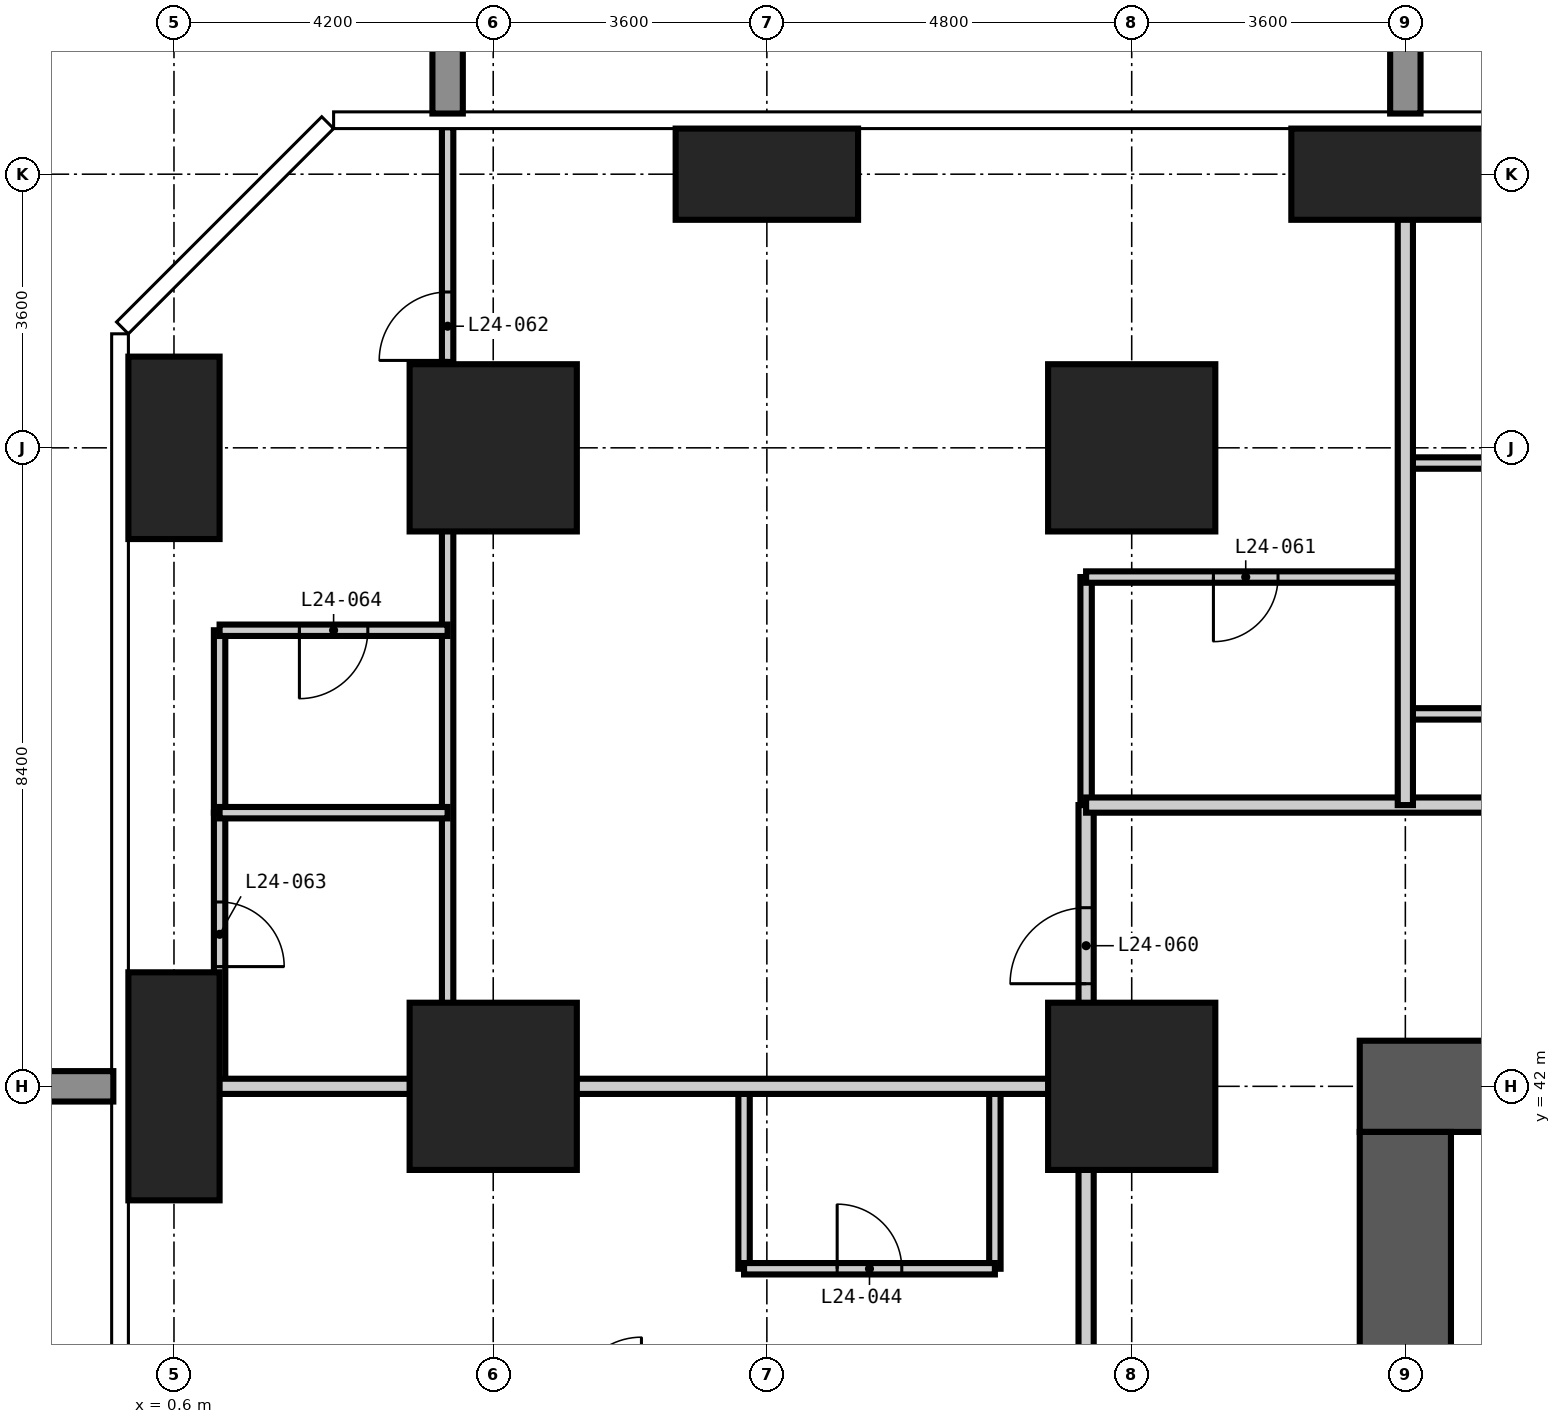
"""IFC4 building model, lengths in metres.
Left out: names, types, materials, properties, quantities, classifications, styles, units other than length and angle.
Written with IfcOpenShell. Run it as: python <this file> out.ifc"""

import sys

from ifc_helpers import new_model, si_unit, direction, frame, frame_2d, origin, origin_2d, place, context, subcontext, project, spatial, rectangle, extrude, element, fill, save


model = new_model("IFC4")
c1 = context("Model", 3, precision=1e-05, world=origin(), true_north=direction((0.0, 1.0)))
c2 = subcontext(c1, "Body", "Model", "MODEL_VIEW")
j1 = project(units=[si_unit("LENGTHUNIT", "METRE"), si_unit("PLANEANGLEUNIT", "RADIAN")], contexts=[c1])
p1 = place(None, origin())
s1 = spatial("IfcSite", under=j1, at=p1, CompositionType="ELEMENT")
p2 = place(p1, origin())
s2 = spatial("IfcBuilding", under=s1, at=p2, CompositionType="ELEMENT")
p3 = place(p2, frame((0.0, 0.0, 97.2)))
s3 = spatial("IfcBuildingStorey", under=s2, at=p3, CompositionType="ELEMENT", Elevation=97.2)
p4 = place(p3, frame((0.6, 42.0, -0.35), z_axis=(0.0, 0.0, 1.0), x_axis=(1.0, 0.0, 0.0)))
e1 = element("IfcColumn", 1, at=p4, inside=s3, PredefinedType="COLUMN", context=c2, shape_type="SweptSolid", body=[
    extrude(rectangle(XDim=1.2, YDim=3.0, at=origin_2d()), origin(), (0.0, 0.0, 1.0), 3.6),
])
p5 = place(p3, frame((0.6, 50.4, -0.35), z_axis=(0.0, 0.0, 1.0), x_axis=(1.0, 0.0, 0.0)))
e2 = element("IfcColumn", 2, at=p5, inside=s3, PredefinedType="COLUMN", context=c2, shape_type="SweptSolid", body=[
    extrude(rectangle(XDim=1.2, YDim=2.4, at=origin_2d()), origin(), (0.0, 0.0, 1.0), 3.6),
])
for number, where, z_axis, x_axis in (
    (3, (4.8, 42.0, -0.35), (0.0, 0.0, 1.0), (1.0, 0.0, 0.0)),
    (4, (4.8, 50.4, -0.35), (0.0, 0.0, 1.0), (1.0, 0.0, 0.0)),
):
    element("IfcColumn", number, at=place(p3, frame(where, z_axis=z_axis, x_axis=x_axis)), inside=s3, PredefinedType="COLUMN", context=c2, shape_type="SweptSolid", body=[
        extrude(rectangle(XDim=2.2, YDim=2.2, at=origin_2d()), origin(), (0.0, 0.0, 1.0), 3.6),
    ])
p6 = place(p3, frame((8.4, 54.0, -0.35), z_axis=(0.0, 0.0, 1.0), x_axis=(1.0, 0.0, 0.0)))
e5 = element("IfcColumn", 5, at=p6, inside=s3, PredefinedType="COLUMN", context=c2, shape_type="SweptSolid", body=[
    extrude(rectangle(XDim=2.4, YDim=1.2, at=origin_2d()), origin(), (0.0, 0.0, 1.0), 3.6),
])
for number, where, z_axis, x_axis in (
    (6, (13.2, 42.0, -0.35), (0.0, 0.0, 1.0), (1.0, 0.0, 0.0)),
    (7, (13.2, 50.4, -0.35), (0.0, 0.0, 1.0), (1.0, 0.0, 0.0)),
):
    element("IfcColumn", number, at=place(p3, frame(where, z_axis=z_axis, x_axis=x_axis)), inside=s3, PredefinedType="COLUMN", context=c2, shape_type="SweptSolid", body=[
        extrude(rectangle(XDim=2.2, YDim=2.2, at=origin_2d()), origin(), (0.0, 0.0, 1.0), 3.6),
    ])
p7 = place(p3, frame((16.8, 54.0, -0.35), z_axis=(0.0, 0.0, 1.0), x_axis=(1.0, 0.0, 0.0)))
e8 = element("IfcColumn", 8, at=p7, inside=s3, PredefinedType="COLUMN", context=c2, shape_type="SweptSolid", body=[
    extrude(rectangle(XDim=3.0, YDim=1.2, at=origin_2d()), origin(), (0.0, 0.0, 1.0), 3.6),
])
p8 = place(p3, frame((42.6, 42.0, -0.35), z_axis=(0.0, 0.0, 1.0), x_axis=(-1.0, 0.0, 0.0)))
e9 = element("IfcWall", 9, at=p8, inside=s3, PredefinedType="SHEAR", context=c2, shape_type="SweptSolid", body=[
    extrude(rectangle(XDim=26.4, YDim=1.2, at=frame_2d((13.2, 0.0))), origin(), (0.0, 0.0, 1.0), 3.6),
])
p9 = place(p8, frame((21.1, 0.0, 0.35)))
e10 = element("IfcOpeningElement", 10, at=p9, cuts=e9, PredefinedType="OPENING", context=c2, shape_type="SweptSolid", body=[
    extrude(rectangle(XDim=1.0, YDim=2.1, at=frame_2d((0.5, 1.05))), frame((0.0, 0.61, 0.0), z_axis=(0.0, -1.0, 0.0), x_axis=(1.0, 0.0, 0.0)), (0.0, 0.0, 1.0), 1.22),
])
p10 = place(p8, frame((10.5, 0.0, 0.35)))
e11 = element("IfcOpeningElement", 11, at=p10, cuts=e9, PredefinedType="OPENING", context=c2, shape_type="SweptSolid", body=[
    extrude(rectangle(XDim=1.2, YDim=2.2, at=frame_2d((0.6, 1.1))), frame((0.0, 0.61, 0.0), z_axis=(0.0, -1.0, 0.0), x_axis=(1.0, 0.0, 0.0)), (0.0, 0.0, 1.0), 1.22),
])
p11 = place(p3, frame((16.8, 41.4, -0.35), z_axis=(0.0, 0.0, 1.0), x_axis=(0.0, -1.0, 0.0)))
e12 = element("IfcWall", 12, at=p11, inside=s3, PredefinedType="SHEAR", context=c2, shape_type="SweptSolid", body=[
    extrude(rectangle(XDim=24.0, YDim=1.2, at=frame_2d((12.0, 0.0))), origin(), (0.0, 0.0, 1.0), 3.6),
])
p12 = place(p11, frame((11.1, 0.0, 0.35)))
e13 = element("IfcOpeningElement", 13, at=p12, cuts=e12, PredefinedType="OPENING", context=c2, shape_type="SweptSolid", body=[
    extrude(rectangle(XDim=1.8, YDim=2.2, at=frame_2d((0.9, 1.1))), frame((0.0, 0.61, 0.0), z_axis=(0.0, -1.0, 0.0), x_axis=(1.0, 0.0, 0.0)), (0.0, 0.0, 1.0), 1.22),
])
p13 = place(p11, frame((19.9, 0.0, 0.35)))
e14 = element("IfcOpeningElement", 14, at=p13, cuts=e12, PredefinedType="OPENING", context=c2, shape_type="SweptSolid", body=[
    extrude(rectangle(XDim=1.0, YDim=2.1, at=frame_2d((0.5, 1.05))), frame((0.0, 0.61, 0.0), z_axis=(0.0, -1.0, 0.0), x_axis=(1.0, 0.0, 0.0)), (0.0, 0.0, 1.0), 1.22),
])
p14 = place(p11, frame((5.2, 0.0, 0.35)))
e15 = element("IfcOpeningElement", 15, at=p14, cuts=e12, PredefinedType="OPENING", context=c2, shape_type="SweptSolid", body=[
    extrude(rectangle(XDim=1.0, YDim=2.1, at=frame_2d((0.5, 1.05))), frame((0.0, 0.61, 0.0), z_axis=(0.0, -1.0, 0.0), x_axis=(1.0, 0.0, 0.0)), (0.0, 0.0, 1.0), 1.22),
])
p15 = place(p3, frame((1.2, 42.0, 0.0), z_axis=(0.0, 0.0, 1.0), x_axis=(0.0, 1.0, 0.0)))
e16 = element("IfcWall", 16, at=p15, inside=s3, PredefinedType="PARTITIONING", context=c2, shape_type="SweptSolid", body=[
    extrude(rectangle(XDim=3.6, YDim=0.15, at=frame_2d((1.8, 0.0))), origin(), (0.0, 0.0, 1.0), 3.25),
])
p16 = place(p15, frame((1.575, 0.0, 0.0)))
e17 = element("IfcOpeningElement", 17, at=p16, cuts=e16, PredefinedType="OPENING", context=c2, shape_type="SweptSolid", body=[
    extrude(rectangle(XDim=0.85, YDim=2.1, at=frame_2d((0.425, 1.05))), frame((0.0, 0.085, 0.0), z_axis=(0.0, -1.0, 0.0), x_axis=(1.0, 0.0, 0.0)), (0.0, 0.0, 1.0), 0.17),
])
for number, where, z_axis, x_axis in (
    (18, (8.1, 39.6, 0.0), (0.0, 0.0, 1.0), (0.0, 1.0, 0.0)),
    (19, (11.4, 39.6, 0.0), (0.0, 0.0, 1.0), (0.0, 1.0, 0.0)),
):
    element("IfcWall", number, at=place(p3, frame(where, z_axis=z_axis, x_axis=x_axis)), inside=s3, PredefinedType="PARTITIONING", context=c2, shape_type="SweptSolid", body=[
        extrude(rectangle(XDim=2.4, YDim=0.15, at=frame_2d((1.2, 0.0))), origin(), (0.0, 0.0, 1.0), 3.25),
    ])
p17 = place(p3, frame((12.6, 45.7, 0.0), z_axis=(0.0, 0.0, 1.0), x_axis=(0.0, 1.0, 0.0)))
e20 = element("IfcWall", 20, at=p17, inside=s3, PredefinedType="PARTITIONING", context=c2, shape_type="SweptSolid", body=[
    extrude(rectangle(XDim=3.0, YDim=0.15, at=frame_2d((1.5, 0.0))), origin(), (0.0, 0.0, 1.0), 3.25),
])
p18 = place(p3, frame((8.1, 39.6, 0.0), z_axis=(0.0, 0.0, 1.0), x_axis=(1.0, 0.0, 0.0)))
e21 = element("IfcWall", 21, at=p18, inside=s3, PredefinedType="PARTITIONING", context=c2, shape_type="SweptSolid", body=[
    extrude(rectangle(XDim=3.3, YDim=0.15, at=frame_2d((1.65, 0.0))), origin(), (0.0, 0.0, 1.0), 3.25),
])
p19 = place(p18, frame((1.225, 0.0, 0.0)))
e22 = element("IfcOpeningElement", 22, at=p19, cuts=e21, PredefinedType="OPENING", context=c2, shape_type="SweptSolid", body=[
    extrude(rectangle(XDim=0.85, YDim=2.1, at=frame_2d((0.425, 1.05))), frame((0.0, 0.085, 0.0), z_axis=(0.0, -1.0, 0.0), x_axis=(1.0, 0.0, 0.0)), (0.0, 0.0, 1.0), 0.17),
])
p20 = place(p3, frame((16.8, 46.9, 0.0), z_axis=(0.0, 0.0, 1.0), x_axis=(1.0, 0.0, 0.0)))
e23 = element("IfcWall", 23, at=p20, inside=s3, PredefinedType="PARTITIONING", context=c2, shape_type="SweptSolid", body=[
    extrude(rectangle(XDim=2.4, YDim=0.15, at=frame_2d((1.2, 0.0))), origin(), (0.0, 0.0, 1.0), 3.25),
])
p21 = place(p3, frame((12.6, 48.7, 0.0), z_axis=(0.0, 0.0, 1.0), x_axis=(1.0, 0.0, 0.0)))
e24 = element("IfcWall", 24, at=p21, inside=s3, PredefinedType="PARTITIONING", context=c2, shape_type="SweptSolid", body=[
    extrude(rectangle(XDim=4.2, YDim=0.15, at=frame_2d((2.1, 0.0))), origin(), (0.0, 0.0, 1.0), 3.25),
])
p22 = place(p21, frame((1.675, 0.0, 0.0)))
e25 = element("IfcOpeningElement", 25, at=p22, cuts=e24, PredefinedType="OPENING", context=c2, shape_type="SweptSolid", body=[
    extrude(rectangle(XDim=0.85, YDim=2.1, at=frame_2d((0.425, 1.05))), frame((0.0, 0.085, 0.0), z_axis=(0.0, -1.0, 0.0), x_axis=(1.0, 0.0, 0.0)), (0.0, 0.0, 1.0), 0.17),
])
p23 = place(p3, frame((16.8, 50.2, 0.0), z_axis=(0.0, 0.0, 1.0), x_axis=(1.0, 0.0, 0.0)))
e26 = element("IfcWall", 26, at=p23, inside=s3, PredefinedType="PARTITIONING", context=c2, shape_type="SweptSolid", body=[
    extrude(rectangle(XDim=2.4, YDim=0.15, at=frame_2d((1.2, 0.0))), origin(), (0.0, 0.0, 1.0), 3.25),
])
p24 = place(p3, frame((12.6, 13.7, 0.0), z_axis=(0.0, 0.0, 1.0), x_axis=(0.0, 1.0, 0.0)))
e27 = element("IfcWall", 27, at=p24, inside=s3, PredefinedType="PARTITIONING", context=c2, shape_type="SweptSolid", body=[
    extrude(rectangle(XDim=32.0, YDim=0.2, at=frame_2d((16.0, 0.0))), origin(), (0.0, 0.0, 1.0), 3.25),
])
p25 = place(p24, frame((5.6, 0.0, 0.0)))
e28 = element("IfcOpeningElement", 28, at=p25, cuts=e27, PredefinedType="OPENING", context=c2, shape_type="SweptSolid", body=[
    extrude(rectangle(XDim=1.0, YDim=2.2, at=frame_2d((0.5, 1.1))), frame((0.0, 0.11, 0.0), z_axis=(0.0, -1.0, 0.0), x_axis=(1.0, 0.0, 0.0)), (0.0, 0.0, 1.0), 0.22),
])
p26 = place(p24, frame((16.4, 0.0, 0.0)))
e29 = element("IfcOpeningElement", 29, at=p26, cuts=e27, PredefinedType="OPENING", context=c2, shape_type="SweptSolid", body=[
    extrude(rectangle(XDim=1.0, YDim=2.2, at=frame_2d((0.5, 1.1))), frame((0.0, 0.11, 0.0), z_axis=(0.0, -1.0, 0.0), x_axis=(1.0, 0.0, 0.0)), (0.0, 0.0, 1.0), 0.22),
])
p27 = place(p24, frame((22.4, 0.0, 0.0)))
e30 = element("IfcOpeningElement", 30, at=p27, cuts=e27, PredefinedType="OPENING", context=c2, shape_type="SweptSolid", body=[
    extrude(rectangle(XDim=1.0, YDim=2.2, at=frame_2d((0.5, 1.1))), frame((0.0, 0.11, 0.0), z_axis=(0.0, -1.0, 0.0), x_axis=(1.0, 0.0, 0.0)), (0.0, 0.0, 1.0), 0.22),
])
p28 = place(p24, frame((0.95, 0.0, 0.0)))
e31 = element("IfcOpeningElement", 31, at=p28, cuts=e27, PredefinedType="OPENING", context=c2, shape_type="SweptSolid", body=[
    extrude(rectangle(XDim=1.0, YDim=2.2, at=frame_2d((0.5, 1.1))), frame((0.0, 0.11, 0.0), z_axis=(0.0, -1.0, 0.0), x_axis=(1.0, 0.0, 0.0)), (0.0, 0.0, 1.0), 0.22),
])
p29 = place(p24, frame((29.65, 0.0, 0.0)))
e32 = element("IfcOpeningElement", 32, at=p29, cuts=e27, PredefinedType="OPENING", context=c2, shape_type="SweptSolid", body=[
    extrude(rectangle(XDim=1.0, YDim=2.2, at=frame_2d((0.5, 1.1))), frame((0.0, 0.11, 0.0), z_axis=(0.0, -1.0, 0.0), x_axis=(1.0, 0.0, 0.0)), (0.0, 0.0, 1.0), 0.22),
])
p30 = place(p3, frame((12.6, 45.7, 0.0), z_axis=(0.0, 0.0, 1.0), x_axis=(1.0, 0.0, 0.0)))
e33 = element("IfcWall", 33, at=p30, inside=s3, PredefinedType="PARTITIONING", context=c2, shape_type="SweptSolid", body=[
    extrude(rectangle(XDim=31.9, YDim=0.2, at=frame_2d((15.95, 0.0))), origin(), (0.0, 0.0, 1.0), 3.25),
])
p31 = place(p30, frame((5.8, 0.0, 0.0)))
e34 = element("IfcOpeningElement", 34, at=p31, cuts=e33, PredefinedType="OPENING", context=c2, shape_type="SweptSolid", body=[
    extrude(rectangle(XDim=1.0, YDim=2.2, at=frame_2d((0.5, 1.1))), frame((0.0, 0.11, 0.0), z_axis=(0.0, -1.0, 0.0), x_axis=(1.0, 0.0, 0.0)), (0.0, 0.0, 1.0), 0.22),
])
p32 = place(p30, frame((12.1, 0.0, 0.0)))
e35 = element("IfcOpeningElement", 35, at=p32, cuts=e33, PredefinedType="OPENING", context=c2, shape_type="SweptSolid", body=[
    extrude(rectangle(XDim=1.0, YDim=2.2, at=frame_2d((0.5, 1.1))), frame((0.0, 0.11, 0.0), z_axis=(0.0, -1.0, 0.0), x_axis=(1.0, 0.0, 0.0)), (0.0, 0.0, 1.0), 0.22),
])
p33 = place(p30, frame((20.5, 0.0, 0.0)))
e36 = element("IfcOpeningElement", 36, at=p33, cuts=e33, PredefinedType="OPENING", context=c2, shape_type="SweptSolid", body=[
    extrude(rectangle(XDim=1.0, YDim=2.2, at=frame_2d((0.5, 1.1))), frame((0.0, 0.11, 0.0), z_axis=(0.0, -1.0, 0.0), x_axis=(1.0, 0.0, 0.0)), (0.0, 0.0, 1.0), 0.22),
])
p34 = place(p30, frame((26.8, 0.0, 0.0)))
e37 = element("IfcOpeningElement", 37, at=p34, cuts=e33, PredefinedType="OPENING", context=c2, shape_type="SweptSolid", body=[
    extrude(rectangle(XDim=1.0, YDim=2.2, at=frame_2d((0.5, 1.1))), frame((0.0, 0.11, 0.0), z_axis=(0.0, -1.0, 0.0), x_axis=(1.0, 0.0, 0.0)), (0.0, 0.0, 1.0), 0.22),
])
p35 = place(p3, frame((16.8, 45.7, 0.0), z_axis=(0.0, 0.0, 1.0), x_axis=(0.0, 1.0, 0.0)))
e38 = element("IfcWall", 38, at=p35, inside=s3, PredefinedType="PARTITIONING", context=c2, shape_type="SweptSolid", body=[
    extrude(rectangle(XDim=8.918, YDim=0.2, at=frame_2d((4.459, 0.0))), origin(), (0.0, 0.0, 1.0), 3.25),
])
p36 = place(p3, frame((-0.018, 42.0, 0.0), z_axis=(0.0, 0.0, 1.0), x_axis=(1.0, 0.0, 0.0)))
e39 = element("IfcWall", 39, at=p36, inside=s3, PredefinedType="PARTITIONING", context=c2, shape_type="SweptSolid", body=[
    extrude(rectangle(XDim=12.618, YDim=0.2, at=frame_2d((6.309, 0.0))), origin(), (0.0, 0.0, 1.0), 3.25),
])
p37 = place(p3, frame((1.2, 45.6, 0.0), z_axis=(0.0, 0.0, 1.0), x_axis=(0.0, 1.0, 0.0)))
e40 = element("IfcWall", 40, at=p37, inside=s3, PredefinedType="PARTITIONING", context=c2, shape_type="SweptSolid", body=[
    extrude(rectangle(XDim=2.4, YDim=0.15, at=frame_2d((1.2, 0.0))), origin(), (0.0, 0.0, 1.0), 3.25),
])
p38 = place(p3, frame((4.2, 42.0, 0.0), z_axis=(0.0, 0.0, 1.0), x_axis=(0.0, 1.0, 0.0)))
e41 = element("IfcWall", 41, at=p38, inside=s3, PredefinedType="PARTITIONING", context=c2, shape_type="SweptSolid", body=[
    extrude(rectangle(XDim=12.618, YDim=0.15, at=frame_2d((6.309, 0.0))), origin(), (0.0, 0.0, 1.0), 3.25),
])
p39 = place(p38, frame((9.55, 0.0, 0.0)))
e42 = element("IfcOpeningElement", 42, at=p39, cuts=e41, PredefinedType="OPENING", context=c2, shape_type="SweptSolid", body=[
    extrude(rectangle(XDim=0.9, YDim=2.1, at=frame_2d((0.45, 1.05))), frame((0.0, 0.085, 0.0), z_axis=(0.0, -1.0, 0.0), x_axis=(1.0, 0.0, 0.0)), (0.0, 0.0, 1.0), 0.17),
])
p40 = place(p3, frame((1.2, 45.6, 0.0), z_axis=(0.0, 0.0, 1.0), x_axis=(1.0, 0.0, 0.0)))
e43 = element("IfcWall", 43, at=p40, inside=s3, PredefinedType="PARTITIONING", context=c2, shape_type="SweptSolid", body=[
    extrude(rectangle(XDim=3.0, YDim=0.15, at=frame_2d((1.5, 0.0))), origin(), (0.0, 0.0, 1.0), 3.25),
])
p41 = place(p3, frame((1.2, 48.0, 0.0), z_axis=(0.0, 0.0, 1.0), x_axis=(1.0, 0.0, 0.0)))
e44 = element("IfcWall", 44, at=p41, inside=s3, PredefinedType="PARTITIONING", context=c2, shape_type="SweptSolid", body=[
    extrude(rectangle(XDim=3.0, YDim=0.15, at=frame_2d((1.5, 0.0))), origin(), (0.0, 0.0, 1.0), 3.25),
])
p42 = place(p41, frame((1.05, 0.0, 0.0)))
e45 = element("IfcOpeningElement", 45, at=p42, cuts=e44, PredefinedType="OPENING", context=c2, shape_type="SweptSolid", body=[
    extrude(rectangle(XDim=0.9, YDim=2.1, at=frame_2d((0.45, 1.05))), frame((0.0, 0.085, 0.0), z_axis=(0.0, -1.0, 0.0), x_axis=(1.0, 0.0, 0.0)), (0.0, 0.0, 1.0), 0.17),
])
p43 = place(p19, origin())
e46 = element("IfcDoor", 46, at=p43, inside=s3, OperationType="SINGLE_SWING_LEFT", PredefinedType="DOOR", context=c2, shape_type="SweptSolid", body=[
    extrude(rectangle(XDim=0.85, YDim=2.1, at=frame_2d((0.425, 1.05))), frame((0.0, 0.025, 0.0), z_axis=(0.0, -1.0, 0.0), x_axis=(1.0, 0.0, 0.0)), (0.0, 0.0, 1.0), 0.05),
])
fill(e22, e46)
p44 = place(p29, origin())
e47 = element("IfcDoor", 47, at=p44, inside=s3, OperationType="SINGLE_SWING_LEFT", PredefinedType="DOOR", context=c2, shape_type="SweptSolid", body=[
    extrude(rectangle(XDim=1.0, YDim=2.2, at=frame_2d((0.5, 1.1))), frame((0.0, 0.025, 0.0), z_axis=(0.0, -1.0, 0.0), x_axis=(1.0, 0.0, 0.0)), (0.0, 0.0, 1.0), 0.05),
])
fill(e32, e47)
p45 = place(p22, frame((0.85, 0.0, 0.0), z_axis=(0.0, 0.0, 1.0), x_axis=(-1.0, 0.0, 0.0)))
e48 = element("IfcDoor", 48, at=p45, inside=s3, OperationType="SINGLE_SWING_RIGHT", PredefinedType="DOOR", context=c2, shape_type="SweptSolid", body=[
    extrude(rectangle(XDim=0.85, YDim=2.1, at=frame_2d((0.425, 1.05))), frame((0.0, 0.025, 0.0), z_axis=(0.0, -1.0, 0.0), x_axis=(1.0, 0.0, 0.0)), (0.0, 0.0, 1.0), 0.05),
])
fill(e25, e48)
p46 = place(p39, origin())
e49 = element("IfcDoor", 49, at=p46, inside=s3, OperationType="SINGLE_SWING_LEFT", PredefinedType="DOOR", context=c2, shape_type="SweptSolid", body=[
    extrude(rectangle(XDim=0.9, YDim=2.1, at=frame_2d((0.45, 1.05))), frame((0.0, 0.025, 0.0), z_axis=(0.0, -1.0, 0.0), x_axis=(1.0, 0.0, 0.0)), (0.0, 0.0, 1.0), 0.05),
])
fill(e42, e49)
p47 = place(p16, frame((0.85, 0.0, 0.0), z_axis=(0.0, 0.0, 1.0), x_axis=(-1.0, 0.0, 0.0)))
e50 = element("IfcDoor", 50, at=p47, inside=s3, OperationType="SINGLE_SWING_RIGHT", PredefinedType="DOOR", context=c2, shape_type="SweptSolid", body=[
    extrude(rectangle(XDim=0.85, YDim=2.1, at=frame_2d((0.425, 1.05))), frame((0.0, 0.025, 0.0), z_axis=(0.0, -1.0, 0.0), x_axis=(1.0, 0.0, 0.0)), (0.0, 0.0, 1.0), 0.05),
])
fill(e17, e50)
p48 = place(p42, frame((0.9, 0.0, 0.0), z_axis=(0.0, 0.0, 1.0), x_axis=(-1.0, 0.0, 0.0)))
e51 = element("IfcDoor", 51, at=p48, inside=s3, OperationType="SINGLE_SWING_RIGHT", PredefinedType="DOOR", context=c2, shape_type="SweptSolid", body=[
    extrude(rectangle(XDim=0.9, YDim=2.1, at=frame_2d((0.45, 1.05))), frame((0.0, 0.025, 0.0), z_axis=(0.0, -1.0, 0.0), x_axis=(1.0, 0.0, 0.0)), (0.0, 0.0, 1.0), 0.05),
])
fill(e45, e51)
save(model, sys.argv[1])
